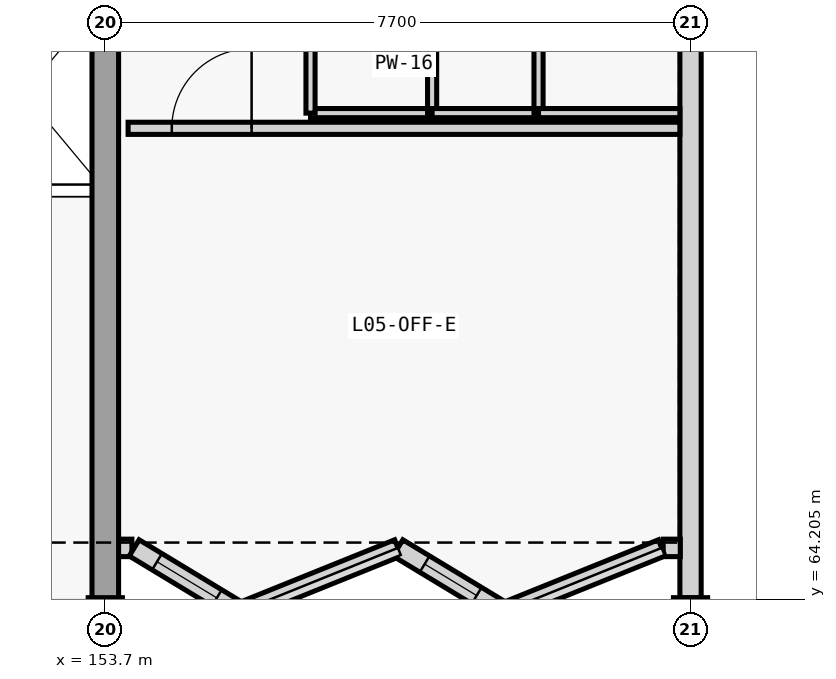
"""IFC4 building model, lengths in metres.
Left out: names, types, materials, properties, quantities, classifications, styles, units other than length and angle.
Written with IfcOpenShell. Run it as: python <this file> out.ifc"""

import sys

from ifc_helpers import new_model, si_unit, direction, frame, frame_2d, origin, origin_2d, place, context, subcontext, project, spatial, rectangle, extrude, element, fill, save


model = new_model("IFC4")
c1 = context("Model", 3, precision=1e-05, world=origin(), true_north=direction((0.0, 1.0)))
c2 = subcontext(c1, "Body", "Model", "MODEL_VIEW")
j1 = project(units=[si_unit("LENGTHUNIT", "METRE"), si_unit("PLANEANGLEUNIT", "RADIAN")], contexts=[c1])
p1 = place(None, origin())
s1 = spatial("IfcSite", under=j1, at=p1, CompositionType="ELEMENT")
p2 = place(p1, origin())
s2 = spatial("IfcBuilding", under=s1, at=p2, CompositionType="ELEMENT")
p3 = place(p2, frame((0.0, 0.0, 21.6)))
s3 = spatial("IfcBuildingStorey", under=s2, at=p3, CompositionType="ELEMENT", Elevation=21.6)
for number, where, z_axis, x_axis in (
    (1, (153.7, 64.0, 0.0), (0.0, 0.0, 1.0), (1.0, 0.0, 0.0)),
    (2, (161.4, 64.0, 0.0), (0.0, 0.0, 1.0), (1.0, 0.0, 0.0)),
):
    element("IfcColumn", number, at=place(p3, frame(where, z_axis=z_axis, x_axis=x_axis)), inside=s3, PredefinedType="COLUMN", context=c2, shape_type="SweptSolid", body=[
        extrude(rectangle(XDim=0.45, YDim=0.45, at=origin_2d()), origin(), (0.0, 0.0, 1.0), 3.6),
    ])
p4 = place(p3, frame((161.4, 96.777, 0.0), z_axis=(0.0, 0.0, 1.0), x_axis=(0.0, -1.0, 0.0)))
e3 = element("IfcWall", 3, at=p4, inside=s3, PredefinedType="SOLIDWALL", context=c2, shape_type="SweptSolid", body=[
    extrude(rectangle(XDim=32.554, YDim=0.28, at=frame_2d((16.277, 0.0))), origin(), (0.0, 0.0, 1.0), 1.98),
])
p5 = place(p4, frame((17.477, 0.0, 0.64)))
e4 = element("IfcOpeningElement", 4, at=p5, cuts=e3, PredefinedType="OPENING", context=c2, shape_type="SweptSolid", body=[
    extrude(rectangle(XDim=5.4, YDim=1.2, at=frame_2d((2.7, 0.6))), frame((0.0, 0.15, 0.0), z_axis=(0.0, -1.0, 0.0), x_axis=(1.0, 0.0, 0.0)), (0.0, 0.0, 1.0), 0.3),
])
p6 = place(p3, frame((154.05, 64.88, 0.0), z_axis=(0.0, 0.0, 1.0), x_axis=(-1.0, 0.0, 0.0)))
e5 = element("IfcWall", 5, at=p6, inside=s3, PredefinedType="SOLIDWALL", context=c2, shape_type="SweptSolid", body=[
    extrude(rectangle(XDim=0.18, YDim=0.23, at=frame_2d((0.09, 0.0))), origin(), (0.0, 0.0, 1.0), 3.36),
])
p7 = place(p3, frame((161.265, 64.88, 0.0), z_axis=(0.0, 0.0, 1.0), x_axis=(-1.0, 0.0, 0.0)))
e6 = element("IfcWall", 6, at=p7, inside=s3, PredefinedType="SOLIDWALL", context=c2, shape_type="SweptSolid", body=[
    extrude(rectangle(XDim=0.225, YDim=0.23, at=frame_2d((0.112, 0.0))), origin(), (0.0, 0.0, 1.0), 3.36),
])
p8 = place(p3, frame((155.468, 64.04, 0.0), z_axis=(0.0, 0.0, 1.0), x_axis=(-0.855561475997, 0.51770122734, 0.0)))
e7 = element("IfcWall", 7, at=p8, inside=s3, PredefinedType="SOLIDWALL", context=c2, shape_type="SweptSolid", body=[
    extrude(rectangle(XDim=1.622, YDim=0.25, at=frame_2d((0.811, 0.0))), origin(), (0.0, 0.0, 1.0), 3.36),
])
p9 = place(p8, frame((0.351, 0.0, 0.82)))
e8 = element("IfcOpeningElement", 8, at=p9, cuts=e7, PredefinedType="OPENING", context=c2, shape_type="SweptSolid", body=[
    extrude(rectangle(XDim=0.92, YDim=1.38, at=frame_2d((0.46, 0.69))), frame((0.0, 0.135, 0.0), z_axis=(0.0, -1.0, 0.0), x_axis=(1.0, 0.0, 0.0)), (0.0, 0.0, 1.0), 0.27),
])
p10 = place(p3, frame((157.55, 64.88, 0.0), z_axis=(0.0, 0.0, 1.0), x_axis=(-0.927392797001, -0.374089026933, 0.0)))
e9 = element("IfcWall", 9, at=p10, inside=s3, PredefinedType="SOLIDWALL", context=c2, shape_type="SweptSolid", body=[
    extrude(rectangle(XDim=2.245, YDim=0.23, at=frame_2d((1.123, 0.0))), origin(), (0.0, 0.0, 1.0), 3.36),
])
p11 = place(p3, frame((158.938, 64.04, 0.0), z_axis=(0.0, 0.0, 1.0), x_axis=(-0.855561475997, 0.51770122734, 0.0)))
e10 = element("IfcWall", 10, at=p11, inside=s3, PredefinedType="SOLIDWALL", context=c2, shape_type="SweptSolid", body=[
    extrude(rectangle(XDim=1.622, YDim=0.25, at=frame_2d((0.811, 0.0))), origin(), (0.0, 0.0, 1.0), 3.36),
])
p12 = place(p11, frame((0.411, 0.0, 0.82)))
e11 = element("IfcOpeningElement", 11, at=p12, cuts=e10, PredefinedType="OPENING", context=c2, shape_type="SweptSolid", body=[
    extrude(rectangle(XDim=0.8, YDim=1.35, at=frame_2d((0.4, 0.675))), frame((0.0, 0.135, 0.0), z_axis=(0.0, -1.0, 0.0), x_axis=(1.0, 0.0, 0.0)), (0.0, 0.0, 1.0), 0.27),
])
p13 = place(p3, frame((161.02, 64.88, 0.0), z_axis=(0.0, 0.0, 1.0), x_axis=(-0.927392797001, -0.374089026933, 0.0)))
e12 = element("IfcWall", 12, at=p13, inside=s3, PredefinedType="SOLIDWALL", context=c2, shape_type="SweptSolid", body=[
    extrude(rectangle(XDim=2.245, YDim=0.23, at=frame_2d((1.123, 0.0))), origin(), (0.0, 0.0, 1.0), 3.36),
])
p14 = place(p3, frame((153.7, 64.0, 0.0), z_axis=(0.0, 0.0, 1.0), x_axis=(0.0, 1.0, 0.0)))
e13 = element("IfcWall", 13, at=p14, inside=s3, PredefinedType="SHEAR", context=c2, shape_type="SweptSolid", body=[
    extrude(rectangle(XDim=8.4, YDim=0.35, at=frame_2d((4.2, 0.0))), origin(), (0.0, 0.0, 1.0), 3.6),
])
p15 = place(p3, frame((156.4, 70.6, 0.0), z_axis=(0.0, 0.0, 1.0), x_axis=(1.0, 0.0, 0.0)))
e14 = element("IfcWall", 14, at=p15, inside=s3, PredefinedType="PARTITIONING", context=c2, shape_type="SweptSolid", body=[
    extrude(rectangle(XDim=1.6, YDim=0.12, at=frame_2d((0.8, 0.0))), origin(), (0.0, 0.0, 1.0), 3.34),
])
p16 = place(p3, frame((156.4, 70.6, 0.0), z_axis=(0.0, 0.0, 1.0), x_axis=(0.0, 1.0, 0.0)))
e15 = element("IfcWall", 15, at=p16, inside=s3, PredefinedType="PARTITIONING", context=c2, shape_type="SweptSolid", body=[
    extrude(rectangle(XDim=5.2, YDim=0.12, at=frame_2d((2.6, 0.0))), origin(), (0.0, 0.0, 1.0), 3.34),
])
p17 = place(p16, frame((2.16, 0.0, 0.0)))
e16 = element("IfcOpeningElement", 16, at=p17, cuts=e15, PredefinedType="OPENING", context=c2, shape_type="SweptSolid", body=[
    extrude(rectangle(XDim=0.88, YDim=2.1, at=frame_2d((0.44, 1.05))), frame((0.0, 0.07, 0.0), z_axis=(0.0, -1.0, 0.0), x_axis=(1.0, 0.0, 0.0)), (0.0, 0.0, 1.0), 0.14),
])
p18 = place(p3, frame((158.0, 70.6, 0.0), z_axis=(0.0, 0.0, 1.0), x_axis=(0.0, 1.0, 0.0)))
e17 = element("IfcWall", 17, at=p18, inside=s3, PredefinedType="PARTITIONING", context=c2, shape_type="SweptSolid", body=[
    extrude(rectangle(XDim=5.2, YDim=0.12, at=frame_2d((2.6, 0.0))), origin(), (0.0, 0.0, 1.0), 3.34),
])
p19 = place(p3, frame((158.0, 70.6, 0.0), z_axis=(0.0, 0.0, 1.0), x_axis=(1.0, 0.0, 0.0)))
e18 = element("IfcWall", 18, at=p19, inside=s3, PredefinedType="PARTITIONING", context=c2, shape_type="SweptSolid", body=[
    extrude(rectangle(XDim=1.4, YDim=0.12, at=frame_2d((0.7, 0.0))), origin(), (0.0, 0.0, 1.0), 3.34),
])
p20 = place(p3, frame((159.4, 70.6, 0.0), z_axis=(0.0, 0.0, 1.0), x_axis=(0.0, 1.0, 0.0)))
e19 = element("IfcWall", 19, at=p20, inside=s3, PredefinedType="PARTITIONING", context=c2, shape_type="SweptSolid", body=[
    extrude(rectangle(XDim=5.2, YDim=0.12, at=frame_2d((2.6, 0.0))), origin(), (0.0, 0.0, 1.0), 3.34),
])
p21 = place(p3, frame((159.4, 70.6, 0.0), z_axis=(0.0, 0.0, 1.0), x_axis=(1.0, 0.0, 0.0)))
e20 = element("IfcWall", 20, at=p21, inside=s3, PredefinedType="PARTITIONING", context=c2, shape_type="SweptSolid", body=[
    extrude(rectangle(XDim=1.86, YDim=0.12, at=frame_2d((0.93, 0.0))), origin(), (0.0, 0.0, 1.0), 3.34),
])
p22 = place(p3, frame((154.0, 70.4, 0.0), z_axis=(0.0, 0.0, 1.0), x_axis=(1.0, 0.0, 0.0)))
e21 = element("IfcWall", 21, at=p22, inside=s3, PredefinedType="PARTITIONING", context=c2, shape_type="SweptSolid", body=[
    extrude(rectangle(XDim=7.26, YDim=0.16, at=frame_2d((3.63, 0.0))), origin(), (0.0, 0.0, 1.0), 3.34),
])
p23 = place(p22, frame((0.575, 0.0, 0.0)))
e22 = element("IfcOpeningElement", 22, at=p23, cuts=e21, PredefinedType="OPENING", context=c2, shape_type="SweptSolid", body=[
    extrude(rectangle(XDim=1.05, YDim=2.15, at=frame_2d((0.525, 1.075))), frame((0.0, 0.09, 0.0), z_axis=(0.0, -1.0, 0.0), x_axis=(1.0, 0.0, 0.0)), (0.0, 0.0, 1.0), 0.18),
])
p24 = place(p9, origin())
e23 = element("IfcWindow", 23, at=p24, inside=s3, PartitioningType="SINGLE_PANEL", PredefinedType="WINDOW", context=c2, shape_type="SweptSolid", body=[
    extrude(rectangle(XDim=0.92, YDim=1.38, at=frame_2d((0.46, 0.69))), frame((0.0, 0.03, 0.0), z_axis=(0.0, -1.0, 0.0), x_axis=(1.0, 0.0, 0.0)), (0.0, 0.0, 1.0), 0.06),
])
fill(e8, e23)
p25 = place(p12, origin())
e24 = element("IfcWindow", 24, at=p25, inside=s3, PartitioningType="SINGLE_PANEL", PredefinedType="WINDOW", context=c2, shape_type="SweptSolid", body=[
    extrude(rectangle(XDim=0.8, YDim=1.35, at=frame_2d((0.4, 0.675))), frame((0.0, 0.03, 0.0), z_axis=(0.0, -1.0, 0.0), x_axis=(1.0, 0.0, 0.0)), (0.0, 0.0, 1.0), 0.06),
])
fill(e11, e24)
p26 = place(p23, origin())
e25 = element("IfcDoor", 25, at=p26, inside=s3, OperationType="SINGLE_SWING_RIGHT", PredefinedType="DOOR", context=c2, shape_type="SweptSolid", body=[
    extrude(rectangle(XDim=1.05, YDim=2.15, at=frame_2d((0.525, 1.075))), frame((0.0, 0.025, 0.0), z_axis=(0.0, -1.0, 0.0), x_axis=(1.0, 0.0, 0.0)), (0.0, 0.0, 1.0), 0.05),
])
fill(e22, e25)
save(model, sys.argv[1])
